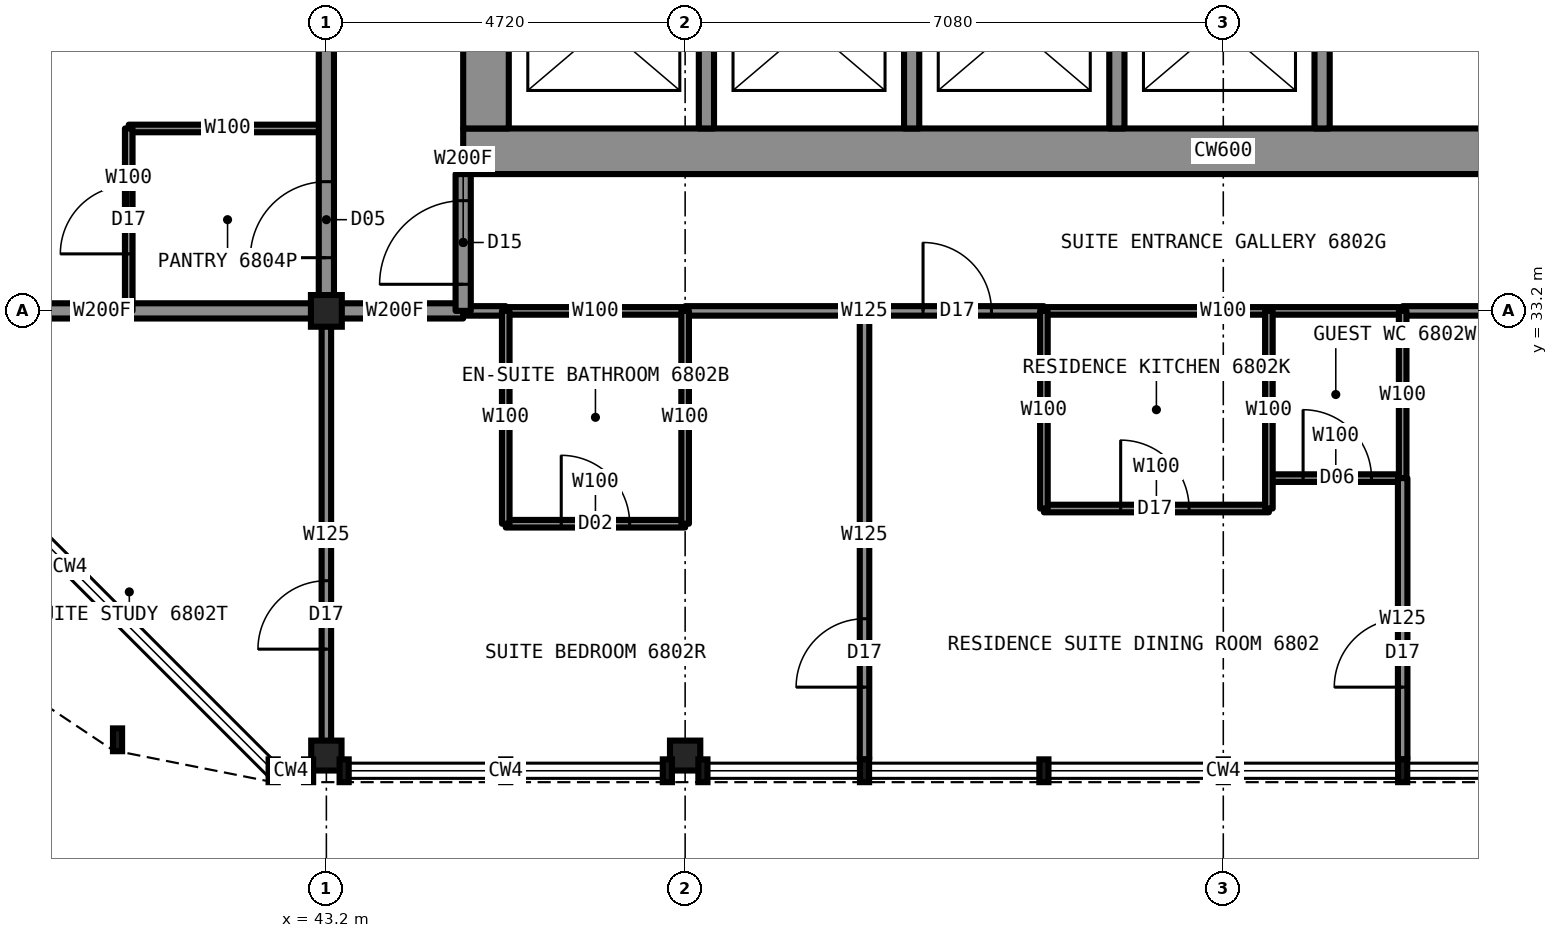
"""IFC4 building model, lengths in metres.
Left out: names, types, materials, properties, quantities, classifications, styles, units other than length and angle.
Written with IfcOpenShell. Run it as: python <this file> out.ifc"""

import sys

from ifc_helpers import new_model, si_unit, direction, frame, frame_2d, origin, origin_2d, place, context, subcontext, project, spatial, rectangle, i_section, extrude, element, fill, save


model = new_model("IFC4")
c1 = context("Model", 3, precision=1e-05, world=origin(), true_north=direction((0.0, 1.0)))
c2 = subcontext(c1, "Body", "Model", "MODEL_VIEW")
j1 = project(units=[si_unit("LENGTHUNIT", "METRE"), si_unit("PLANEANGLEUNIT", "RADIAN")], contexts=[c1])
p1 = place(None, origin())
s1 = spatial("IfcSite", under=j1, at=p1, CompositionType="ELEMENT")
p2 = place(p1, origin())
s2 = spatial("IfcBuilding", under=s1, at=p2, CompositionType="ELEMENT")
p3 = place(p2, frame((0.0, 0.0, 247.7)))
s3 = spatial("IfcBuildingStorey", under=s2, at=p3, CompositionType="ELEMENT", Elevation=247.7)
for number, where, z_axis, x_axis in (
    (1, (43.2, 27.35, 0.0), (0.0, 0.0, 1.0), (1.0, 0.0, 0.0)),
    (2, (47.92, 27.35, 0.0), (0.0, 0.0, 1.0), (1.0, 0.0, 0.0)),
):
    element("IfcColumn", number, at=place(p3, frame(where, z_axis=z_axis, x_axis=x_axis)), inside=s3, PredefinedType="COLUMN", context=c2, shape_type="SweptSolid", body=[
        extrude(i_section(OverallWidth=0.399, OverallDepth=0.394, WebThickness=0.023, FlangeThickness=0.037, at=origin_2d()), origin(), (0.0, 0.0, 1.0), 3.5),
    ])
p4 = place(p3, frame((43.2, 33.2, 0.0), z_axis=(0.0, 0.0, 1.0), x_axis=(1.0, 0.0, 0.0)))
e3 = element("IfcColumn", 3, at=p4, inside=s3, PredefinedType="COLUMN", context=c2, shape_type="SweptSolid", body=[
    extrude(i_section(OverallWidth=0.406, OverallDepth=0.417, WebThickness=0.03, FlangeThickness=0.048, at=origin_2d()), origin(), (0.0, 0.0, 1.0), 3.5),
])
p5 = place(p3, frame((45.0, 35.3, 0.0), z_axis=(0.0, 0.0, 1.0), x_axis=(1.0, 0.0, 0.0)))
e4 = element("IfcWall", 4, at=p5, inside=s3, PredefinedType="SHEAR", context=c2, shape_type="SweptSolid", body=[
    extrude(rectangle(XDim=20.0, YDim=0.6, at=frame_2d((10.0, 0.0))), origin(), (0.0, 0.0, 1.0), 3.5),
])
p6 = place(p3, frame((45.3, 35.6, 0.0), z_axis=(0.0, 0.0, 1.0), x_axis=(0.0, 1.0, 0.0)))
e5 = element("IfcWall", 5, at=p6, inside=s3, PredefinedType="SHEAR", context=c2, shape_type="SweptSolid", body=[
    extrude(rectangle(XDim=18.8, YDim=0.6, at=frame_2d((9.4, 0.0))), origin(), (0.0, 0.0, 1.0), 3.5),
])
p7 = place(p6, frame((13.4, 0.0, 0.0)))
e6 = element("IfcOpeningElement", 6, at=p7, cuts=e5, PredefinedType="OPENING", context=c2, shape_type="SweptSolid", body=[
    extrude(rectangle(XDim=1.8, YDim=2.2, at=frame_2d((0.9, 1.1))), frame((0.0, 0.31, 0.0), z_axis=(0.0, -1.0, 0.0), x_axis=(1.0, 0.0, 0.0)), (0.0, 0.0, 1.0), 0.62),
])
p8 = place(p6, frame((3.6, 0.0, 0.0)))
e7 = element("IfcOpeningElement", 7, at=p8, cuts=e5, PredefinedType="OPENING", context=c2, shape_type="SweptSolid", body=[
    extrude(rectangle(XDim=1.8, YDim=2.2, at=frame_2d((0.9, 1.1))), frame((0.0, 0.31, 0.0), z_axis=(0.0, -1.0, 0.0), x_axis=(1.0, 0.0, 0.0)), (0.0, 0.0, 1.0), 0.62),
])
p9 = place(p6, frame((6.4, 0.0, 0.0)))
e8 = element("IfcOpeningElement", 8, at=p9, cuts=e5, PredefinedType="OPENING", context=c2, shape_type="SweptSolid", body=[
    extrude(rectangle(XDim=1.2, YDim=2.2, at=frame_2d((0.6, 1.1))), frame((0.0, 0.31, 0.0), z_axis=(0.0, -1.0, 0.0), x_axis=(1.0, 0.0, 0.0)), (0.0, 0.0, 1.0), 0.62),
])
p10 = place(p3, frame((45.56, 33.2, 0.0), z_axis=(0.0, 0.0, 1.0), x_axis=(1.0, 0.0, 0.0)))
e9 = element("IfcWall", 9, at=p10, inside=s3, PredefinedType="PARTITIONING", context=c2, shape_type="SweptSolid", body=[
    extrude(rectangle(XDim=2.36, YDim=0.1, at=frame_2d((1.18, 0.0))), origin(), (0.0, 0.0, 1.0), 3.33),
])
p11 = place(p3, frame((52.64, 33.2, 0.0), z_axis=(0.0, 0.0, 1.0), x_axis=(1.0, 0.0, 0.0)))
e10 = element("IfcWall", 10, at=p11, inside=s3, PredefinedType="PARTITIONING", context=c2, shape_type="SweptSolid", body=[
    extrude(rectangle(XDim=4.72, YDim=0.1, at=frame_2d((2.36, 0.0))), origin(), (0.0, 0.0, 1.0), 3.33),
])
p12 = place(p3, frame((43.2, 33.2, 0.0), z_axis=(0.0, 0.0, 1.0), x_axis=(1.0, 0.0, 0.0)))
e11 = element("IfcWall", 11, at=p12, inside=s3, PredefinedType="PARTITIONING", context=c2, shape_type="SweptSolid", body=[
    extrude(rectangle(XDim=1.8, YDim=0.2, at=frame_2d((0.9, 0.0))), origin(), (0.0, 0.0, 1.0), 3.33),
])
p13 = place(p3, frame((37.3, 33.2, 0.0), z_axis=(0.0, 0.0, 1.0), x_axis=(1.0, 0.0, 0.0)))
e12 = element("IfcWall", 12, at=p13, inside=s3, PredefinedType="PARTITIONING", context=c2, shape_type="SweptSolid", body=[
    extrude(rectangle(XDim=5.9, YDim=0.2, at=frame_2d((2.95, 0.0))), origin(), (0.0, 0.0, 1.0), 2.573),
])
p14 = place(p3, frame((45.0, 33.2, 0.0), z_axis=(0.0, 0.0, 1.0), x_axis=(1.0, 0.0, 0.0)))
e13 = element("IfcWall", 13, at=p14, inside=s3, PredefinedType="PARTITIONING", context=c2, shape_type="SweptSolid", body=[
    extrude(rectangle(XDim=0.56, YDim=0.125, at=frame_2d((0.28, 0.0))), origin(), (0.0, 0.0, 1.0), 3.33),
])
p15 = place(p3, frame((47.92, 33.2, 0.0), z_axis=(0.0, 0.0, 1.0), x_axis=(1.0, 0.0, 0.0)))
e14 = element("IfcWall", 14, at=p15, inside=s3, PredefinedType="PARTITIONING", context=c2, shape_type="SweptSolid", body=[
    extrude(rectangle(XDim=4.72, YDim=0.125, at=frame_2d((2.36, 0.0))), origin(), (0.0, 0.0, 1.0), 3.33),
])
p16 = place(p15, frame((3.13, 0.0, 0.0)))
e15 = element("IfcOpeningElement", 15, at=p16, cuts=e14, PredefinedType="OPENING", context=c2, shape_type="SweptSolid", body=[
    extrude(rectangle(XDim=0.9, YDim=2.2, at=frame_2d((0.45, 1.1))), frame((0.0, 0.073, 0.0), z_axis=(0.0, -1.0, 0.0), x_axis=(1.0, 0.0, 0.0)), (0.0, 0.0, 1.0), 0.145),
])
p17 = place(p3, frame((57.36, 33.2, 0.0), z_axis=(0.0, 0.0, 1.0), x_axis=(1.0, 0.0, 0.0)))
e16 = element("IfcWall", 16, at=p17, inside=s3, PredefinedType="PARTITIONING", context=c2, shape_type="SweptSolid", body=[
    extrude(rectangle(XDim=7.08, YDim=0.125, at=frame_2d((3.54, 0.0))), origin(), (0.0, 0.0, 1.0), 3.33),
])
p18 = place(p3, frame((55.6, 31.0, 0.0), z_axis=(0.0, 0.0, 1.0), x_axis=(1.0, 0.0, 0.0)))
e17 = element("IfcWall", 17, at=p18, inside=s3, PredefinedType="PARTITIONING", context=c2, shape_type="SweptSolid", body=[
    extrude(rectangle(XDim=1.76, YDim=0.1, at=frame_2d((0.88, 0.0))), origin(), (0.0, 0.0, 1.0), 3.33),
])
p19 = place(p18, frame((0.45, 0.0, 0.0)))
e18 = element("IfcOpeningElement", 18, at=p19, cuts=e17, PredefinedType="OPENING", context=c2, shape_type="SweptSolid", body=[
    extrude(rectangle(XDim=0.9, YDim=2.1, at=frame_2d((0.45, 1.05))), frame((0.0, 0.06, 0.0), z_axis=(0.0, -1.0, 0.0), x_axis=(1.0, 0.0, 0.0)), (0.0, 0.0, 1.0), 0.12),
])
p20 = place(p3, frame((52.64, 30.6, 0.0), z_axis=(0.0, 0.0, 1.0), x_axis=(1.0, 0.0, 0.0)))
e19 = element("IfcWall", 19, at=p20, inside=s3, PredefinedType="PARTITIONING", context=c2, shape_type="SweptSolid", body=[
    extrude(rectangle(XDim=2.96, YDim=0.1, at=frame_2d((1.48, 0.0))), origin(), (0.0, 0.0, 1.0), 3.33),
])
p21 = place(p20, frame((1.01, 0.0, 0.0)))
e20 = element("IfcOpeningElement", 20, at=p21, cuts=e19, PredefinedType="OPENING", context=c2, shape_type="SweptSolid", body=[
    extrude(rectangle(XDim=0.9, YDim=2.2, at=frame_2d((0.45, 1.1))), frame((0.0, 0.06, 0.0), z_axis=(0.0, -1.0, 0.0), x_axis=(1.0, 0.0, 0.0)), (0.0, 0.0, 1.0), 0.12),
])
p22 = place(p3, frame((45.56, 30.4, 0.0), z_axis=(0.0, 0.0, 1.0), x_axis=(1.0, 0.0, 0.0)))
e21 = element("IfcWall", 21, at=p22, inside=s3, PredefinedType="PARTITIONING", context=c2, shape_type="SweptSolid", body=[
    extrude(rectangle(XDim=2.36, YDim=0.1, at=frame_2d((1.18, 0.0))), origin(), (0.0, 0.0, 1.0), 3.33),
])
p23 = place(p22, frame((0.73, 0.0, 0.0)))
e22 = element("IfcOpeningElement", 22, at=p23, cuts=e21, PredefinedType="OPENING", context=c2, shape_type="SweptSolid", body=[
    extrude(rectangle(XDim=0.9, YDim=2.1, at=frame_2d((0.45, 1.05))), frame((0.0, 0.06, 0.0), z_axis=(0.0, -1.0, 0.0), x_axis=(1.0, 0.0, 0.0)), (0.0, 0.0, 1.0), 0.12),
])
p24 = place(p3, frame((40.6, 35.6, 0.0), z_axis=(0.0, 0.0, 1.0), x_axis=(1.0, 0.0, 0.0)))
e23 = element("IfcWall", 23, at=p24, inside=s3, PredefinedType="PARTITIONING", context=c2, shape_type="SweptSolid", body=[
    extrude(rectangle(XDim=2.6, YDim=0.1, at=frame_2d((1.3, 0.0))), origin(), (0.0, 0.0, 1.0), 2.797),
])
p25 = place(p3, frame((45.0, 33.2, 0.0), z_axis=(0.0, 0.0, 1.0), x_axis=(0.0, 1.0, 0.0)))
e24 = element("IfcWall", 24, at=p25, inside=s3, PredefinedType="PARTITIONING", context=c2, shape_type="SweptSolid", body=[
    extrude(rectangle(XDim=1.8, YDim=0.2, at=frame_2d((0.9, 0.0))), origin(), (0.0, 0.0, 1.0), 3.33),
])
p26 = place(p25, frame((0.35, 0.0, 0.0)))
e25 = element("IfcOpeningElement", 25, at=p26, cuts=e24, PredefinedType="OPENING", context=c2, shape_type="SweptSolid", body=[
    extrude(rectangle(XDim=1.1, YDim=2.2, at=frame_2d((0.55, 1.1))), frame((0.0, 0.11, 0.0), z_axis=(0.0, -1.0, 0.0), x_axis=(1.0, 0.0, 0.0)), (0.0, 0.0, 1.0), 0.22),
])
p27 = place(p3, frame((43.2, 33.2, 0.0), z_axis=(0.0, 0.0, 1.0), x_axis=(0.0, 1.0, 0.0)))
e26 = element("IfcWall", 26, at=p27, inside=s3, PredefinedType="PARTITIONING", context=c2, shape_type="SweptSolid", body=[
    extrude(rectangle(XDim=23.6, YDim=0.2, at=frame_2d((11.8, 0.0))), origin(), (0.0, 0.0, 1.0), 3.33),
])
p28 = place(p27, frame((8.95, 0.0, 0.0)))
e27 = element("IfcOpeningElement", 27, at=p28, cuts=e26, PredefinedType="OPENING", context=c2, shape_type="SweptSolid", body=[
    extrude(rectangle(XDim=1.1, YDim=2.2, at=frame_2d((0.55, 1.1))), frame((0.0, 0.11, 0.0), z_axis=(0.0, -1.0, 0.0), x_axis=(1.0, 0.0, 0.0)), (0.0, 0.0, 1.0), 0.22),
])
p29 = place(p27, frame((0.7, 0.0, 0.0)))
e28 = element("IfcOpeningElement", 28, at=p29, cuts=e26, PredefinedType="OPENING", context=c2, shape_type="SweptSolid", body=[
    extrude(rectangle(XDim=1.0, YDim=2.1, at=frame_2d((0.5, 1.05))), frame((0.0, 0.11, 0.0), z_axis=(0.0, -1.0, 0.0), x_axis=(1.0, 0.0, 0.0)), (0.0, 0.0, 1.0), 0.22),
])
p30 = place(p3, frame((43.2, 27.3, 0.0), z_axis=(0.0, 0.0, 1.0), x_axis=(0.0, 1.0, 0.0)))
e29 = element("IfcWall", 29, at=p30, inside=s3, PredefinedType="PARTITIONING", context=c2, shape_type="SweptSolid", body=[
    extrude(rectangle(XDim=5.9, YDim=0.125, at=frame_2d((2.95, 0.0))), origin(), (0.0, 0.0, 1.0), 2.573),
])
p31 = place(p30, frame((1.45, 0.0, 0.0)))
e30 = element("IfcOpeningElement", 30, at=p31, cuts=e29, PredefinedType="OPENING", context=c2, shape_type="SweptSolid", body=[
    extrude(rectangle(XDim=0.9, YDim=2.2, at=frame_2d((0.45, 1.1))), frame((0.0, 0.073, 0.0), z_axis=(0.0, -1.0, 0.0), x_axis=(1.0, 0.0, 0.0)), (0.0, 0.0, 1.0), 0.145),
])
p32 = place(p3, frame((40.6, 33.2, 0.0), z_axis=(0.0, 0.0, 1.0), x_axis=(0.0, 1.0, 0.0)))
e31 = element("IfcWall", 31, at=p32, inside=s3, PredefinedType="PARTITIONING", context=c2, shape_type="SweptSolid", body=[
    extrude(rectangle(XDim=2.4, YDim=0.1, at=frame_2d((1.2, 0.0))), origin(), (0.0, 0.0, 1.0), 3.33),
])
p33 = place(p32, frame((0.75, 0.0, 0.0)))
e32 = element("IfcOpeningElement", 32, at=p33, cuts=e31, PredefinedType="OPENING", context=c2, shape_type="SweptSolid", body=[
    extrude(rectangle(XDim=0.9, YDim=2.2, at=frame_2d((0.45, 1.1))), frame((0.0, 0.06, 0.0), z_axis=(0.0, -1.0, 0.0), x_axis=(1.0, 0.0, 0.0)), (0.0, 0.0, 1.0), 0.12),
])
p34 = place(p3, frame((52.64, 30.6, 0.0), z_axis=(0.0, 0.0, 1.0), x_axis=(0.0, 1.0, 0.0)))
e33 = element("IfcWall", 33, at=p34, inside=s3, PredefinedType="PARTITIONING", context=c2, shape_type="SweptSolid", body=[
    extrude(rectangle(XDim=2.6, YDim=0.1, at=frame_2d((1.3, 0.0))), origin(), (0.0, 0.0, 1.0), 3.33),
])
p35 = place(p3, frame((50.28, 27.3, 0.0), z_axis=(0.0, 0.0, 1.0), x_axis=(0.0, 1.0, 0.0)))
e34 = element("IfcWall", 34, at=p35, inside=s3, PredefinedType="PARTITIONING", context=c2, shape_type="SweptSolid", body=[
    extrude(rectangle(XDim=5.9, YDim=0.125, at=frame_2d((2.95, 0.0))), origin(), (0.0, 0.0, 1.0), 3.33),
])
p36 = place(p35, frame((0.95, 0.0, 0.0)))
e35 = element("IfcOpeningElement", 35, at=p36, cuts=e34, PredefinedType="OPENING", context=c2, shape_type="SweptSolid", body=[
    extrude(rectangle(XDim=0.9, YDim=2.2, at=frame_2d((0.45, 1.1))), frame((0.0, 0.073, 0.0), z_axis=(0.0, -1.0, 0.0), x_axis=(1.0, 0.0, 0.0)), (0.0, 0.0, 1.0), 0.145),
])
p37 = place(p3, frame((47.92, 30.4, 0.0), z_axis=(0.0, 0.0, 1.0), x_axis=(0.0, 1.0, 0.0)))
e36 = element("IfcWall", 36, at=p37, inside=s3, PredefinedType="PARTITIONING", context=c2, shape_type="SweptSolid", body=[
    extrude(rectangle(XDim=2.8, YDim=0.1, at=frame_2d((1.4, 0.0))), origin(), (0.0, 0.0, 1.0), 2.573),
])
p38 = place(p3, frame((45.56, 30.4, 0.0), z_axis=(0.0, 0.0, 1.0), x_axis=(0.0, 1.0, 0.0)))
e37 = element("IfcWall", 37, at=p38, inside=s3, PredefinedType="PARTITIONING", context=c2, shape_type="SweptSolid", body=[
    extrude(rectangle(XDim=2.8, YDim=0.1, at=frame_2d((1.4, 0.0))), origin(), (0.0, 0.0, 1.0), 3.33),
])
p39 = place(p3, frame((55.6, 30.6, 0.0), z_axis=(0.0, 0.0, 1.0), x_axis=(0.0, 1.0, 0.0)))
e38 = element("IfcWall", 38, at=p39, inside=s3, PredefinedType="PARTITIONING", context=c2, shape_type="SweptSolid", body=[
    extrude(rectangle(XDim=2.6, YDim=0.1, at=frame_2d((1.3, 0.0))), origin(), (0.0, 0.0, 1.0), 3.33),
])
p40 = place(p3, frame((57.36, 31.0, 0.0), z_axis=(0.0, 0.0, 1.0), x_axis=(0.0, 1.0, 0.0)))
e39 = element("IfcWall", 39, at=p40, inside=s3, PredefinedType="PARTITIONING", context=c2, shape_type="SweptSolid", body=[
    extrude(rectangle(XDim=2.2, YDim=0.1, at=frame_2d((1.1, 0.0))), origin(), (0.0, 0.0, 1.0), 3.33),
])
p41 = place(p3, frame((57.36, 27.3, 0.0), z_axis=(0.0, 0.0, 1.0), x_axis=(0.0, 1.0, 0.0)))
e40 = element("IfcWall", 40, at=p41, inside=s3, PredefinedType="PARTITIONING", context=c2, shape_type="SweptSolid", body=[
    extrude(rectangle(XDim=3.7, YDim=0.125, at=frame_2d((1.85, 0.0))), origin(), (0.0, 0.0, 1.0), 3.33),
])
p42 = place(p41, frame((0.95, 0.0, 0.0)))
e41 = element("IfcOpeningElement", 41, at=p42, cuts=e40, PredefinedType="OPENING", context=c2, shape_type="SweptSolid", body=[
    extrude(rectangle(XDim=0.9, YDim=2.2, at=frame_2d((0.45, 1.1))), frame((0.0, 0.073, 0.0), z_axis=(0.0, -1.0, 0.0), x_axis=(1.0, 0.0, 0.0)), (0.0, 0.0, 1.0), 0.145),
])
for number, where, z_axis, x_axis in (
    (42, (48.2, 35.6, 0.0), (0.0, 0.0, 1.0), (0.0, 1.0, 0.0)),
    (43, (50.9, 35.6, 0.0), (0.0, 0.0, 1.0), (0.0, 1.0, 0.0)),
    (44, (53.6, 35.6, 0.0), (0.0, 0.0, 1.0), (0.0, 1.0, 0.0)),
    (45, (56.3, 35.6, 0.0), (0.0, 0.0, 1.0), (0.0, 1.0, 0.0)),
):
    element("IfcWall", number, at=place(p3, frame(where, z_axis=z_axis, x_axis=x_axis)), inside=s3, PredefinedType="PARTITIONING", context=c2, shape_type="SweptSolid", body=[
        extrude(rectangle(XDim=2.7, YDim=0.2, at=frame_2d((1.35, 0.0))), origin(), (0.0, 0.0, 1.0), 3.33),
    ])
p43 = place(p16, origin())
e46 = element("IfcDoor", 46, at=p43, inside=s3, OperationType="SINGLE_SWING_LEFT", PredefinedType="DOOR", context=c2, shape_type="SweptSolid", body=[
    extrude(rectangle(XDim=0.9, YDim=2.2, at=frame_2d((0.45, 1.1))), frame((0.0, 0.025, 0.0), z_axis=(0.0, -1.0, 0.0), x_axis=(1.0, 0.0, 0.0)), (0.0, 0.0, 1.0), 0.05),
])
fill(e15, e46)
p44 = place(p23, origin())
e47 = element("IfcDoor", 47, at=p44, inside=s3, OperationType="SINGLE_SWING_RIGHT", PredefinedType="DOOR", context=c2, shape_type="SweptSolid", body=[
    extrude(rectangle(XDim=0.9, YDim=2.1, at=frame_2d((0.45, 1.05))), frame((0.0, 0.025, 0.0), z_axis=(0.0, -1.0, 0.0), x_axis=(1.0, 0.0, 0.0)), (0.0, 0.0, 1.0), 0.05),
])
fill(e22, e47)
p45 = place(p26, origin())
e48 = element("IfcDoor", 48, at=p45, inside=s3, OperationType="SINGLE_SWING_LEFT", PredefinedType="DOOR", context=c2, shape_type="SweptSolid", body=[
    extrude(rectangle(XDim=1.1, YDim=2.2, at=frame_2d((0.55, 1.1))), frame((0.0, 0.025, 0.0), z_axis=(0.0, -1.0, 0.0), x_axis=(1.0, 0.0, 0.0)), (0.0, 0.0, 1.0), 0.05),
])
fill(e25, e48)
p46 = place(p21, origin())
e49 = element("IfcDoor", 49, at=p46, inside=s3, OperationType="SINGLE_SWING_LEFT", PredefinedType="DOOR", context=c2, shape_type="SweptSolid", body=[
    extrude(rectangle(XDim=0.9, YDim=2.2, at=frame_2d((0.45, 1.1))), frame((0.0, 0.025, 0.0), z_axis=(0.0, -1.0, 0.0), x_axis=(1.0, 0.0, 0.0)), (0.0, 0.0, 1.0), 0.05),
])
fill(e20, e49)
p47 = place(p42, origin())
e50 = element("IfcDoor", 50, at=p47, inside=s3, OperationType="SINGLE_SWING_LEFT", PredefinedType="DOOR", context=c2, shape_type="SweptSolid", body=[
    extrude(rectangle(XDim=0.9, YDim=2.2, at=frame_2d((0.45, 1.1))), frame((0.0, 0.025, 0.0), z_axis=(0.0, -1.0, 0.0), x_axis=(1.0, 0.0, 0.0)), (0.0, 0.0, 1.0), 0.05),
])
fill(e41, e50)
p48 = place(p36, origin())
e51 = element("IfcDoor", 51, at=p48, inside=s3, OperationType="SINGLE_SWING_LEFT", PredefinedType="DOOR", context=c2, shape_type="SweptSolid", body=[
    extrude(rectangle(XDim=0.9, YDim=2.2, at=frame_2d((0.45, 1.1))), frame((0.0, 0.025, 0.0), z_axis=(0.0, -1.0, 0.0), x_axis=(1.0, 0.0, 0.0)), (0.0, 0.0, 1.0), 0.05),
])
fill(e35, e51)
p49 = place(p31, origin())
e52 = element("IfcDoor", 52, at=p49, inside=s3, OperationType="SINGLE_SWING_LEFT", PredefinedType="DOOR", context=c2, shape_type="SweptSolid", body=[
    extrude(rectangle(XDim=0.9, YDim=2.2, at=frame_2d((0.45, 1.1))), frame((0.0, 0.025, 0.0), z_axis=(0.0, -1.0, 0.0), x_axis=(1.0, 0.0, 0.0)), (0.0, 0.0, 1.0), 0.05),
])
fill(e30, e52)
p50 = place(p19, origin())
e53 = element("IfcDoor", 53, at=p50, inside=s3, OperationType="SINGLE_SWING_LEFT", PredefinedType="DOOR", context=c2, shape_type="SweptSolid", body=[
    extrude(rectangle(XDim=0.9, YDim=2.1, at=frame_2d((0.45, 1.05))), frame((0.0, 0.025, 0.0), z_axis=(0.0, -1.0, 0.0), x_axis=(1.0, 0.0, 0.0)), (0.0, 0.0, 1.0), 0.05),
])
fill(e18, e53)
p51 = place(p33, origin())
e54 = element("IfcDoor", 54, at=p51, inside=s3, OperationType="SINGLE_SWING_LEFT", PredefinedType="DOOR", context=c2, shape_type="SweptSolid", body=[
    extrude(rectangle(XDim=0.9, YDim=2.2, at=frame_2d((0.45, 1.1))), frame((0.0, 0.025, 0.0), z_axis=(0.0, -1.0, 0.0), x_axis=(1.0, 0.0, 0.0)), (0.0, 0.0, 1.0), 0.05),
])
fill(e32, e54)
p52 = place(p29, origin())
e55 = element("IfcDoor", 55, at=p52, inside=s3, OperationType="SINGLE_SWING_LEFT", PredefinedType="DOOR", context=c2, shape_type="SweptSolid", body=[
    extrude(rectangle(XDim=1.0, YDim=2.1, at=frame_2d((0.5, 1.05))), frame((0.0, 0.025, 0.0), z_axis=(0.0, -1.0, 0.0), x_axis=(1.0, 0.0, 0.0)), (0.0, 0.0, 1.0), 0.05),
])
fill(e28, e55)
save(model, sys.argv[1])
